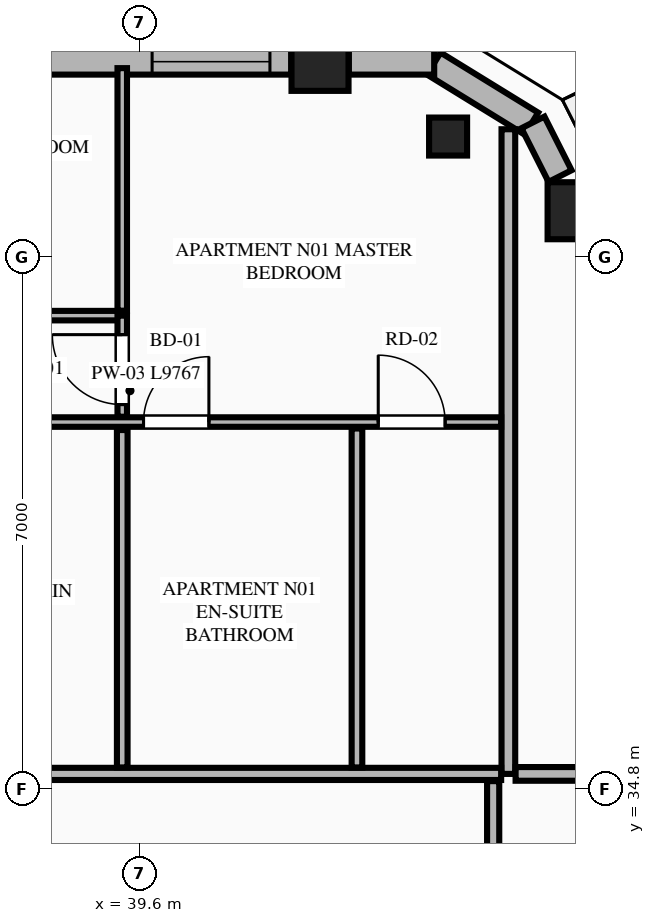
"""IFC4 building model, lengths in metres.
Left out: names, types, materials, properties, quantities, classifications, styles, units other than length and angle.
Written with IfcOpenShell. Run it as: python <this file> out.ifc"""

import sys

from ifc_helpers import new_model, si_unit, direction, frame, frame_2d, origin, origin_2d, place, context, subcontext, project, spatial, rectangle, extrude, element, fill, save


model = new_model("IFC4")
c1 = context("Model", 3, precision=1e-05, world=origin(), true_north=direction((0.0, 1.0)))
c2 = subcontext(c1, "Body", "Model", "MODEL_VIEW")
j1 = project(units=[si_unit("LENGTHUNIT", "METRE"), si_unit("PLANEANGLEUNIT", "RADIAN")], contexts=[c1])
p1 = place(None, origin())
s1 = spatial("IfcSite", under=j1, at=p1, CompositionType="ELEMENT")
p2 = place(p1, origin())
s2 = spatial("IfcBuilding", under=s1, at=p2, CompositionType="ELEMENT")
p3 = place(p2, frame((0.0, 0.0, 241.6)))
s3 = spatial("IfcBuildingStorey", under=s2, at=p3, CompositionType="ELEMENT", Elevation=241.6)
for number, where, z_axis, x_axis in (
    (1, (45.341, 42.409, 0.0), (0.0, 0.0, 1.0), (1.0, 0.0, 0.0)),
    (2, (41.972, 44.361, 0.0), (0.0, 0.0, 1.0), (1.0, 0.0, 0.0)),
):
    element("IfcColumn", number, at=place(p3, frame(where, z_axis=z_axis, x_axis=x_axis)), inside=s3, PredefinedType="COLUMN", context=c2, shape_type="SweptSolid", body=[
        extrude(rectangle(XDim=0.75, YDim=0.75, at=origin_2d()), origin(), (0.0, 0.0, 1.0), 3.65),
    ])
p4 = place(p3, frame((43.657, 43.385, 0.0), z_axis=(0.0, 0.0, 1.0), x_axis=(-0.865256437757, 0.501329529272, 0.0)))
e3 = element("IfcColumn", 3, at=p4, inside=s3, PredefinedType="PILASTER", context=c2, shape_type="SweptSolid", body=[
    extrude(rectangle(XDim=0.5, YDim=0.35, at=origin_2d()), origin(), (0.0, 0.0, 1.0), 3.65),
])
p5 = place(p3, frame((44.753, 43.555, 0.0), z_axis=(0.0, 0.0, 1.0), x_axis=(-0.851680557619, 0.52406128246, 0.0)))
e4 = element("IfcWall", 4, at=p5, inside=s3, PredefinedType="STANDARD", context=c2, shape_type="SweptSolid", body=[
    extrude(rectangle(XDim=1.508, YDim=0.34, at=frame_2d((0.754, 0.0))), origin(), (0.0, 0.0, 1.0), 3.45),
])
p6 = place(p3, frame((45.13, 42.865, 0.0), z_axis=(0.0, 0.0, 1.0), x_axis=(-0.451159191899, 0.892443490404, 0.0)))
e5 = element("IfcWall", 5, at=p6, inside=s3, PredefinedType="STANDARD", context=c2, shape_type="SweptSolid", body=[
    extrude(rectangle(XDim=0.791, YDim=0.34, at=frame_2d((0.396, 0.0))), origin(), (0.0, 0.0, 1.0), 3.45),
])
p7 = place(p3, frame((43.474, 44.37, 0.0), z_axis=(0.0, 0.0, 1.0), x_axis=(-1.0, 0.0, 0.0)))
e6 = element("IfcWall", 6, at=p7, inside=s3, PredefinedType="STANDARD", context=c2, shape_type="SweptSolid", body=[
    extrude(rectangle(XDim=1.123, YDim=0.34, at=frame_2d((0.562, 0.0))), origin(), (0.0, 0.0, 1.0), 3.45),
])
p8 = place(p3, frame((41.593, 44.37, 0.0), z_axis=(0.0, 0.0, 1.0), x_axis=(-1.0, 0.0, 0.0)))
e7 = element("IfcWall", 7, at=p8, inside=s3, PredefinedType="STANDARD", context=c2, shape_type="SweptSolid", body=[
    extrude(rectangle(XDim=5.56, YDim=0.34, at=frame_2d((2.78, 0.0))), origin(), (0.0, 0.0, 1.0), 2.983),
])
p9 = place(p8, frame((0.28, 0.0, 0.75)))
e8 = element("IfcOpeningElement", 8, at=p9, cuts=e7, PredefinedType="OPENING", context=c2, shape_type="SweptSolid", body=[
    extrude(rectangle(XDim=1.55, YDim=2.05, at=frame_2d((0.775, 1.025))), frame((0.0, 0.18, 0.0), z_axis=(0.0, -1.0, 0.0), x_axis=(1.0, 0.0, 0.0)), (0.0, 0.0, 1.0), 0.36),
])
p10 = place(p8, frame((3.398, 0.0, 0.75)))
e9 = element("IfcOpeningElement", 9, at=p10, cuts=e7, PredefinedType="OPENING", context=c2, shape_type="SweptSolid", body=[
    extrude(rectangle(XDim=1.1, YDim=2.0, at=frame_2d((0.55, 1.0))), frame((0.0, 0.18, 0.0), z_axis=(0.0, -1.0, 0.0), x_axis=(1.0, 0.0, 0.0)), (0.0, 0.0, 1.0), 0.36),
])
p11 = place(p3, frame((44.45, 35.0, 0.0), z_axis=(0.0, 0.0, 1.0), x_axis=(0.0, 1.0, 0.0)))
e10 = element("IfcWall", 10, at=p11, inside=s3, PredefinedType="PARTITIONING", context=c2, shape_type="SweptSolid", body=[
    extrude(rectangle(XDim=8.481, YDim=0.18, at=frame_2d((4.24, 0.0))), origin(), (0.0, 0.0, 1.0), 3.45),
])
p12 = place(p3, frame((20.445, 35.0, 0.0), z_axis=(0.0, 0.0, 1.0), x_axis=(1.0, 0.0, 0.0)))
e11 = element("IfcWall", 11, at=p12, inside=s3, PredefinedType="PARTITIONING", context=c2, shape_type="SweptSolid", body=[
    extrude(rectangle(XDim=23.91, YDim=0.16, at=frame_2d((11.955, 0.0))), origin(), (0.0, 0.0, 1.0), 3.45),
])
p13 = place(p12, frame((0.405, 0.0, 0.0)))
e12 = element("IfcOpeningElement", 12, at=p13, cuts=e11, PredefinedType="OPENING", context=c2, shape_type="SweptSolid", body=[
    extrude(rectangle(XDim=1.35, YDim=2.35, at=frame_2d((0.675, 1.175))), frame((0.0, 0.09, 0.0), z_axis=(0.0, -1.0, 0.0), x_axis=(1.0, 0.0, 0.0)), (0.0, 0.0, 1.0), 0.18),
])
p14 = place(p3, frame((34.588, 39.629, 0.0), z_axis=(0.0, 0.0, 1.0), x_axis=(1.0, 0.0, 0.0)))
e13 = element("IfcWall", 13, at=p14, inside=s3, PredefinedType="PARTITIONING", context=c2, shape_type="SweptSolid", body=[
    extrude(rectangle(XDim=9.767, YDim=0.125, at=frame_2d((4.884, 0.0))), origin(), (0.0, 0.0, 1.0), 3.45),
])
p15 = place(p14, frame((5.062, 0.0, 0.0)))
e14 = element("IfcOpeningElement", 14, at=p15, cuts=e13, PredefinedType="OPENING", context=c2, shape_type="SweptSolid", body=[
    extrude(rectangle(XDim=0.86, YDim=2.1, at=frame_2d((0.43, 1.05))), frame((0.0, 0.073, 0.0), z_axis=(0.0, -1.0, 0.0), x_axis=(1.0, 0.0, 0.0)), (0.0, 0.0, 1.0), 0.145),
])
p16 = place(p14, frame((8.15, 0.0, 0.0)))
e15 = element("IfcOpeningElement", 15, at=p16, cuts=e13, PredefinedType="OPENING", context=c2, shape_type="SweptSolid", body=[
    extrude(rectangle(XDim=0.88, YDim=2.15, at=frame_2d((0.44, 1.075))), frame((0.0, 0.073, 0.0), z_axis=(0.0, -1.0, 0.0), x_axis=(1.0, 0.0, 0.0)), (0.0, 0.0, 1.0), 0.145),
])
p17 = place(p14, frame((0.3, 0.0, 0.0)))
e16 = element("IfcOpeningElement", 16, at=p17, cuts=e13, PredefinedType="OPENING", context=c2, shape_type="SweptSolid", body=[
    extrude(rectangle(XDim=0.88, YDim=2.15, at=frame_2d((0.44, 1.075))), frame((0.0, 0.073, 0.0), z_axis=(0.0, -1.0, 0.0), x_axis=(1.0, 0.0, 0.0)), (0.0, 0.0, 1.0), 0.145),
])
p18 = place(p3, frame((29.508, 41.029, 0.0), z_axis=(0.0, 0.0, 1.0), x_axis=(1.0, 0.0, 0.0)))
e17 = element("IfcWall", 17, at=p18, inside=s3, PredefinedType="PARTITIONING", context=c2, shape_type="SweptSolid", body=[
    extrude(rectangle(XDim=9.862, YDim=0.125, at=frame_2d((4.931, 0.0))), origin(), (0.0, 0.0, 1.0), 3.45),
])
p19 = place(p18, frame((0.35, 0.0, 0.0)))
e18 = element("IfcOpeningElement", 18, at=p19, cuts=e17, PredefinedType="OPENING", context=c2, shape_type="SweptSolid", body=[
    extrude(rectangle(XDim=0.92, YDim=2.15, at=frame_2d((0.46, 1.075))), frame((0.0, 0.073, 0.0), z_axis=(0.0, -1.0, 0.0), x_axis=(1.0, 0.0, 0.0)), (0.0, 0.0, 1.0), 0.145),
])
p20 = place(p18, frame((5.43, 0.0, 0.0)))
e19 = element("IfcOpeningElement", 19, at=p20, cuts=e17, PredefinedType="OPENING", context=c2, shape_type="SweptSolid", body=[
    extrude(rectangle(XDim=0.92, YDim=2.15, at=frame_2d((0.46, 1.075))), frame((0.0, 0.073, 0.0), z_axis=(0.0, -1.0, 0.0), x_axis=(1.0, 0.0, 0.0)), (0.0, 0.0, 1.0), 0.145),
])
p21 = place(p3, frame((39.37, 39.699, 0.0), z_axis=(0.0, 0.0, 1.0), x_axis=(0.0, 1.0, 0.0)))
e20 = element("IfcWall", 20, at=p21, inside=s3, PredefinedType="PARTITIONING", context=c2, shape_type="SweptSolid", body=[
    extrude(rectangle(XDim=1.33, YDim=0.125, at=frame_2d((0.665, 0.0))), origin(), (0.0, 0.0, 1.0), 3.45),
])
p22 = place(p21, frame((0.16, 0.0, 0.0)))
e21 = element("IfcOpeningElement", 21, at=p22, cuts=e20, PredefinedType="OPENING", context=c2, shape_type="SweptSolid", body=[
    extrude(rectangle(XDim=0.92, YDim=2.15, at=frame_2d((0.46, 1.075))), frame((0.0, 0.073, 0.0), z_axis=(0.0, -1.0, 0.0), x_axis=(1.0, 0.0, 0.0)), (0.0, 0.0, 1.0), 0.145),
])
p23 = place(p3, frame((39.37, 41.094, 0.0), z_axis=(0.0, 0.0, 1.0), x_axis=(0.0, 1.0, 0.0)))
e22 = element("IfcWall", 22, at=p23, inside=s3, PredefinedType="PARTITIONING", context=c2, shape_type="SweptSolid", body=[
    extrude(rectangle(XDim=3.191, YDim=0.125, at=frame_2d((1.595, 0.0))), origin(), (0.0, 0.0, 1.0), 3.45),
])
p24 = place(p3, frame((39.37, 35.085, 0.0), z_axis=(0.0, 0.0, 1.0), x_axis=(0.0, 1.0, 0.0)))
e23 = element("IfcWall", 23, at=p24, inside=s3, PredefinedType="PLUMBINGWALL", context=c2, shape_type="SweptSolid", body=[
    extrude(rectangle(XDim=4.439, YDim=0.14, at=frame_2d((2.219, 0.0))), origin(), (0.0, 0.0, 1.0), 3.45),
])
p25 = place(p3, frame((42.458, 35.085, 0.0), z_axis=(0.0, 0.0, 1.0), x_axis=(0.0, 1.0, 0.0)))
e24 = element("IfcWall", 24, at=p25, inside=s3, PredefinedType="PLUMBINGWALL", context=c2, shape_type="SweptSolid", body=[
    extrude(rectangle(XDim=4.459, YDim=0.14, at=frame_2d((2.229, 0.0))), origin(), (0.0, 0.0, 1.0), 3.45),
])
p26 = place(p3, frame((44.545, 35.0, 0.0), z_axis=(0.0, 0.0, 1.0), x_axis=(1.0, 0.0, 0.0)))
e25 = element("IfcWall", 25, at=p26, inside=s3, PredefinedType="PARTITIONING", context=c2, shape_type="SweptSolid", body=[
    extrude(rectangle(XDim=4.322, YDim=0.18, at=frame_2d((2.161, 0.0))), origin(), (0.0, 0.0, 1.0), 3.45),
])
p27 = place(p3, frame((44.25, 16.495, 0.0), z_axis=(0.0, 0.0, 1.0), x_axis=(0.0, 1.0, 0.0)))
e26 = element("IfcWall", 26, at=p27, inside=s3, PredefinedType="PARTITIONING", context=c2, shape_type="SweptSolid", body=[
    extrude(rectangle(XDim=18.41, YDim=0.16, at=frame_2d((9.205, 0.0))), origin(), (0.0, 0.0, 1.0), 3.137),
])
p28 = place(p27, frame((0.45, 0.0, 0.0)))
e27 = element("IfcOpeningElement", 27, at=p28, cuts=e26, PredefinedType="OPENING", context=c2, shape_type="SweptSolid", body=[
    extrude(rectangle(XDim=1.02, YDim=2.25, at=frame_2d((0.51, 1.125))), frame((0.0, 0.09, 0.0), z_axis=(0.0, -1.0, 0.0), x_axis=(1.0, 0.0, 0.0)), (0.0, 0.0, 1.0), 0.18),
])
p29 = place(p9, origin())
e28 = element("IfcWindow", 28, at=p29, inside=s3, PartitioningType="SINGLE_PANEL", PredefinedType="WINDOW", context=c2, shape_type="SweptSolid", body=[
    extrude(rectangle(XDim=1.55, YDim=2.05, at=frame_2d((0.775, 1.025))), frame((0.0, 0.03, 0.0), z_axis=(0.0, -1.0, 0.0), x_axis=(1.0, 0.0, 0.0)), (0.0, 0.0, 1.0), 0.06),
])
fill(e8, e28)
p30 = place(p15, origin())
e29 = element("IfcDoor", 29, at=p30, inside=s3, OperationType="SINGLE_SWING_RIGHT", PredefinedType="DOOR", context=c2, shape_type="SweptSolid", body=[
    extrude(rectangle(XDim=0.86, YDim=2.1, at=frame_2d((0.43, 1.05))), frame((0.0, 0.025, 0.0), z_axis=(0.0, -1.0, 0.0), x_axis=(1.0, 0.0, 0.0)), (0.0, 0.0, 1.0), 0.05),
])
fill(e14, e29)
p31 = place(p16, origin())
e30 = element("IfcDoor", 30, at=p31, inside=s3, OperationType="SINGLE_SWING_LEFT", PredefinedType="DOOR", context=c2, shape_type="SweptSolid", body=[
    extrude(rectangle(XDim=0.88, YDim=2.15, at=frame_2d((0.44, 1.075))), frame((0.0, 0.025, 0.0), z_axis=(0.0, -1.0, 0.0), x_axis=(1.0, 0.0, 0.0)), (0.0, 0.0, 1.0), 0.05),
])
fill(e15, e30)
p32 = place(p22, origin())
e31 = element("IfcDoor", 31, at=p32, inside=s3, OperationType="SINGLE_SWING_RIGHT", PredefinedType="DOOR", context=c2, shape_type="SweptSolid", body=[
    extrude(rectangle(XDim=0.92, YDim=2.15, at=frame_2d((0.46, 1.075))), frame((0.0, 0.025, 0.0), z_axis=(0.0, -1.0, 0.0), x_axis=(1.0, 0.0, 0.0)), (0.0, 0.0, 1.0), 0.05),
])
fill(e21, e31)
save(model, sys.argv[1])
